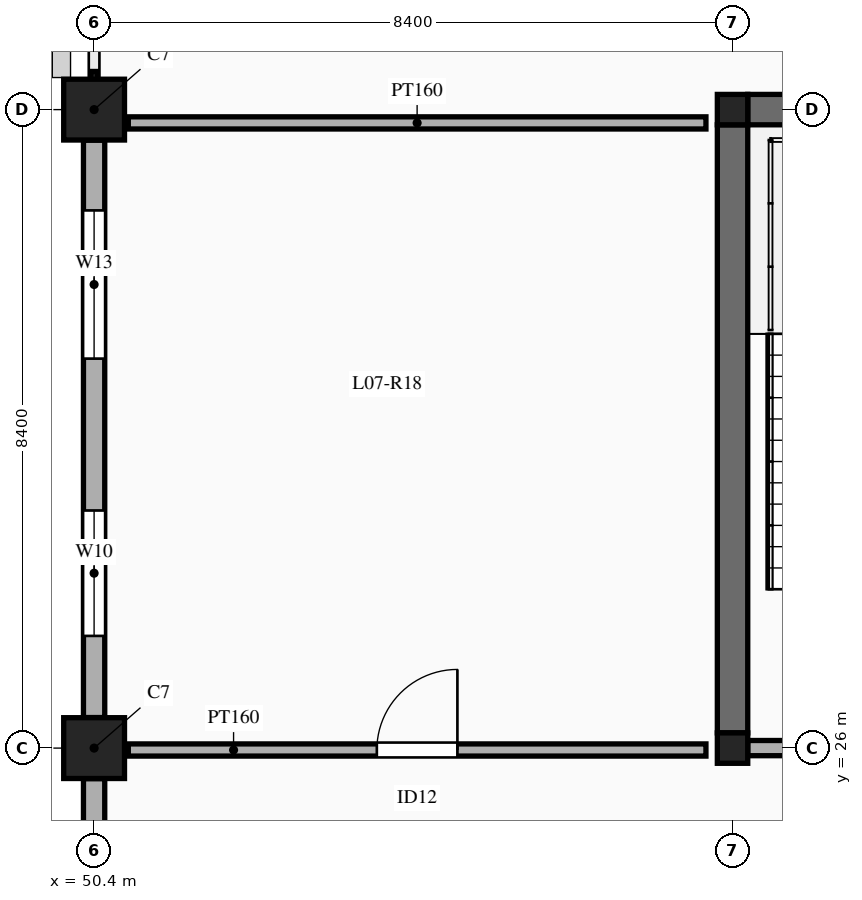
"""IFC4 building model, lengths in metres.
Left out: names, types, materials, properties, quantities, classifications, styles, units other than length and angle.
Written with IfcOpenShell. Run it as: python <this file> out.ifc"""

import sys

from ifc_helpers import new_model, si_unit, direction, frame, frame_2d, origin, origin_2d, place, context, subcontext, project, spatial, rectangle, extrude, element, fill, save


model = new_model("IFC4")
c1 = context("Model", 3, precision=1e-05, world=origin(), true_north=direction((0.0, 1.0)))
c2 = subcontext(c1, "Body", "Model", "MODEL_VIEW")
j1 = project(units=[si_unit("LENGTHUNIT", "METRE"), si_unit("PLANEANGLEUNIT", "RADIAN")], contexts=[c1])
p1 = place(None, origin())
s1 = spatial("IfcSite", under=j1, at=p1, CompositionType="ELEMENT")
p2 = place(p1, origin())
s2 = spatial("IfcBuilding", under=s1, at=p2, CompositionType="ELEMENT")
p3 = place(p2, frame((0.0, 0.0, 33.0)))
s3 = spatial("IfcBuildingStorey", under=s2, at=p3, CompositionType="ELEMENT", Elevation=33.0)
for number, where, z_axis, x_axis in (
    (1, (50.4, 26.0, 0.0), (0.0, 0.0, 1.0), (1.0, 0.0, 0.0)),
    (2, (50.4, 34.4, 0.0), (0.0, 0.0, 1.0), (1.0, 0.0, 0.0)),
):
    element("IfcColumn", number, at=place(p3, frame(where, z_axis=z_axis, x_axis=x_axis)), inside=s3, PredefinedType="COLUMN", context=c2, shape_type="SweptSolid", body=[
        extrude(rectangle(XDim=0.8, YDim=0.8, at=origin_2d()), origin(), (0.0, 0.0, 1.0), 4.5),
    ])
for number, where, z_axis, x_axis in (
    (3, (58.8, 26.0, 0.0), (0.0, 0.0, 1.0), (1.0, 0.0, 0.0)),
    (4, (58.8, 34.4, 0.0), (0.0, 0.0, 1.0), (1.0, 0.0, 0.0)),
):
    element("IfcColumn", number, at=place(p3, frame(where, z_axis=z_axis, x_axis=x_axis)), inside=s3, PredefinedType="COLUMN", context=c2, shape_type="SweptSolid", body=[
        extrude(rectangle(XDim=0.4, YDim=0.4, at=origin_2d()), origin(), (0.0, 0.0, 1.0), 4.5),
    ])
for number, where, z_axis, x_axis in (
    (5, (58.8, 26.2, 0.0), (0.0, 0.0, 1.0), (0.0, 1.0, 0.0)),
    (6, (59.0, 34.4, 0.0), (0.0, 0.0, 1.0), (1.0, 0.0, 0.0)),
):
    element("IfcWall", number, at=place(p3, frame(where, z_axis=z_axis, x_axis=x_axis)), inside=s3, PredefinedType="SHEAR", context=c2, shape_type="SweptSolid", body=[
        extrude(rectangle(XDim=8.0, YDim=0.4, at=frame_2d((4.0, 0.0))), origin(), (0.0, 0.0, 1.0), 4.5),
    ])
p4 = place(p3, frame((50.4, 18.002, 0.0), z_axis=(0.0, 0.0, 1.0), x_axis=(0.0, 1.0, 0.0)))
e7 = element("IfcWall", 7, at=p4, inside=s3, PredefinedType="ELEMENTEDWALL", context=c2, shape_type="SweptSolid", body=[
    extrude(rectangle(XDim=7.596, YDim=0.28, at=frame_2d((3.798, 0.0))), origin(), (0.0, 0.0, 1.0), 3.55),
])
p5 = place(p4, frame((1.074, 0.0, 0.9)))
e8 = element("IfcOpeningElement", 8, at=p5, cuts=e7, PredefinedType="OPENING", context=c2, shape_type="SweptSolid", body=[
    extrude(rectangle(XDim=1.65, YDim=1.95, at=frame_2d((0.825, 0.975))), frame((0.0, 0.15, 0.0), z_axis=(0.0, -1.0, 0.0), x_axis=(1.0, 0.0, 0.0)), (0.0, 0.0, 1.0), 0.3),
])
p6 = place(p4, frame((4.722, 0.0, 0.9)))
e9 = element("IfcOpeningElement", 9, at=p6, cuts=e7, PredefinedType="OPENING", context=c2, shape_type="SweptSolid", body=[
    extrude(rectangle(XDim=1.95, YDim=2.0, at=frame_2d((0.975, 1.0))), frame((0.0, 0.15, 0.0), z_axis=(0.0, -1.0, 0.0), x_axis=(1.0, 0.0, 0.0)), (0.0, 0.0, 1.0), 0.3),
])
p7 = place(p3, frame((50.4, 26.402, 0.0), z_axis=(0.0, 0.0, 1.0), x_axis=(0.0, 1.0, 0.0)))
e10 = element("IfcWall", 10, at=p7, inside=s3, PredefinedType="ELEMENTEDWALL", context=c2, shape_type="SweptSolid", body=[
    extrude(rectangle(XDim=7.596, YDim=0.28, at=frame_2d((3.798, 0.0))), origin(), (0.0, 0.0, 1.0), 3.55),
])
p8 = place(p7, frame((1.074, 0.0, 0.9)))
e11 = element("IfcOpeningElement", 11, at=p8, cuts=e10, PredefinedType="OPENING", context=c2, shape_type="SweptSolid", body=[
    extrude(rectangle(XDim=1.65, YDim=1.95, at=frame_2d((0.825, 0.975))), frame((0.0, 0.15, 0.0), z_axis=(0.0, -1.0, 0.0), x_axis=(1.0, 0.0, 0.0)), (0.0, 0.0, 1.0), 0.3),
])
p9 = place(p7, frame((4.722, 0.0, 0.9)))
e12 = element("IfcOpeningElement", 12, at=p9, cuts=e10, PredefinedType="OPENING", context=c2, shape_type="SweptSolid", body=[
    extrude(rectangle(XDim=1.95, YDim=2.0, at=frame_2d((0.975, 1.0))), frame((0.0, 0.15, 0.0), z_axis=(0.0, -1.0, 0.0), x_axis=(1.0, 0.0, 0.0)), (0.0, 0.0, 1.0), 0.3),
])
p10 = place(p3, frame((59.0, 26.0, 0.0), z_axis=(0.0, 0.0, 1.0), x_axis=(1.0, 0.0, 0.0)))
e13 = element("IfcWall", 13, at=p10, inside=s3, PredefinedType="SOLIDWALL", context=c2, shape_type="SweptSolid", body=[
    extrude(rectangle(XDim=8.0, YDim=0.2, at=frame_2d((4.0, 0.0))), origin(), (0.0, 0.0, 1.0), 3.73),
])
p11 = place(p10, frame((1.55, 0.0, 0.0)))
e14 = element("IfcOpeningElement", 14, at=p11, cuts=e13, PredefinedType="OPENING", context=c2, shape_type="SweptSolid", body=[
    extrude(rectangle(XDim=1.15, YDim=2.15, at=frame_2d((0.575, 1.075))), frame((0.0, 0.11, 0.0), z_axis=(0.0, -1.0, 0.0), x_axis=(1.0, 0.0, 0.0)), (0.0, 0.0, 1.0), 0.22),
])
p12 = place(p10, frame((5.35, 0.0, 0.0)))
e15 = element("IfcOpeningElement", 15, at=p12, cuts=e13, PredefinedType="OPENING", context=c2, shape_type="SweptSolid", body=[
    extrude(rectangle(XDim=1.22, YDim=2.15, at=frame_2d((0.61, 1.075))), frame((0.0, 0.11, 0.0), z_axis=(0.0, -1.0, 0.0), x_axis=(1.0, 0.0, 0.0)), (0.0, 0.0, 1.0), 0.22),
])
p13 = place(p3, frame((50.85, 25.975, 0.0), z_axis=(0.0, 0.0, 1.0), x_axis=(1.0, 0.0, 0.0)))
e16 = element("IfcWall", 16, at=p13, inside=s3, PredefinedType="PARTITIONING", context=c2, shape_type="SweptSolid", body=[
    extrude(rectangle(XDim=7.6, YDim=0.16, at=frame_2d((3.8, 0.0))), origin(), (0.0, 0.0, 1.0), 3.45),
])
p14 = place(p13, frame((3.27, 0.0, 0.0)))
e17 = element("IfcOpeningElement", 17, at=p14, cuts=e16, PredefinedType="OPENING", context=c2, shape_type="SweptSolid", body=[
    extrude(rectangle(XDim=1.06, YDim=2.18, at=frame_2d((0.53, 1.09))), frame((0.0, 0.09, 0.0), z_axis=(0.0, -1.0, 0.0), x_axis=(1.0, 0.0, 0.0)), (0.0, 0.0, 1.0), 0.18),
])
p15 = place(p3, frame((50.85, 34.225, 0.0), z_axis=(0.0, 0.0, 1.0), x_axis=(1.0, 0.0, 0.0)))
e18 = element("IfcWall", 18, at=p15, inside=s3, PredefinedType="PARTITIONING", context=c2, shape_type="SweptSolid", body=[
    extrude(rectangle(XDim=7.6, YDim=0.16, at=frame_2d((3.8, 0.0))), origin(), (0.0, 0.0, 1.0), 3.45),
])
p16 = place(p8, origin())
e19 = element("IfcWindow", 19, at=p16, inside=s3, PartitioningType="DOUBLE_PANEL_HORIZONTAL", PredefinedType="WINDOW", context=c2, shape_type="SweptSolid", body=[
    extrude(rectangle(XDim=1.65, YDim=1.95, at=frame_2d((0.825, 0.975))), frame((0.0, 0.03, 0.0), z_axis=(0.0, -1.0, 0.0), x_axis=(1.0, 0.0, 0.0)), (0.0, 0.0, 1.0), 0.06),
])
fill(e11, e19)
p17 = place(p9, origin())
e20 = element("IfcWindow", 20, at=p17, inside=s3, PartitioningType="TRIPLE_PANEL_VERTICAL", PredefinedType="WINDOW", context=c2, shape_type="SweptSolid", body=[
    extrude(rectangle(XDim=1.95, YDim=2.0, at=frame_2d((0.975, 1.0))), frame((0.0, 0.03, 0.0), z_axis=(0.0, -1.0, 0.0), x_axis=(1.0, 0.0, 0.0)), (0.0, 0.0, 1.0), 0.06),
])
fill(e12, e20)
p18 = place(p14, origin())
e21 = element("IfcDoor", 21, at=p18, inside=s3, OperationType="SINGLE_SWING_RIGHT", PredefinedType="DOOR", context=c2, shape_type="SweptSolid", body=[
    extrude(rectangle(XDim=1.06, YDim=2.18, at=frame_2d((0.53, 1.09))), frame((0.0, 0.025, 0.0), z_axis=(0.0, -1.0, 0.0), x_axis=(1.0, 0.0, 0.0)), (0.0, 0.0, 1.0), 0.05),
])
fill(e17, e21)
save(model, sys.argv[1])
